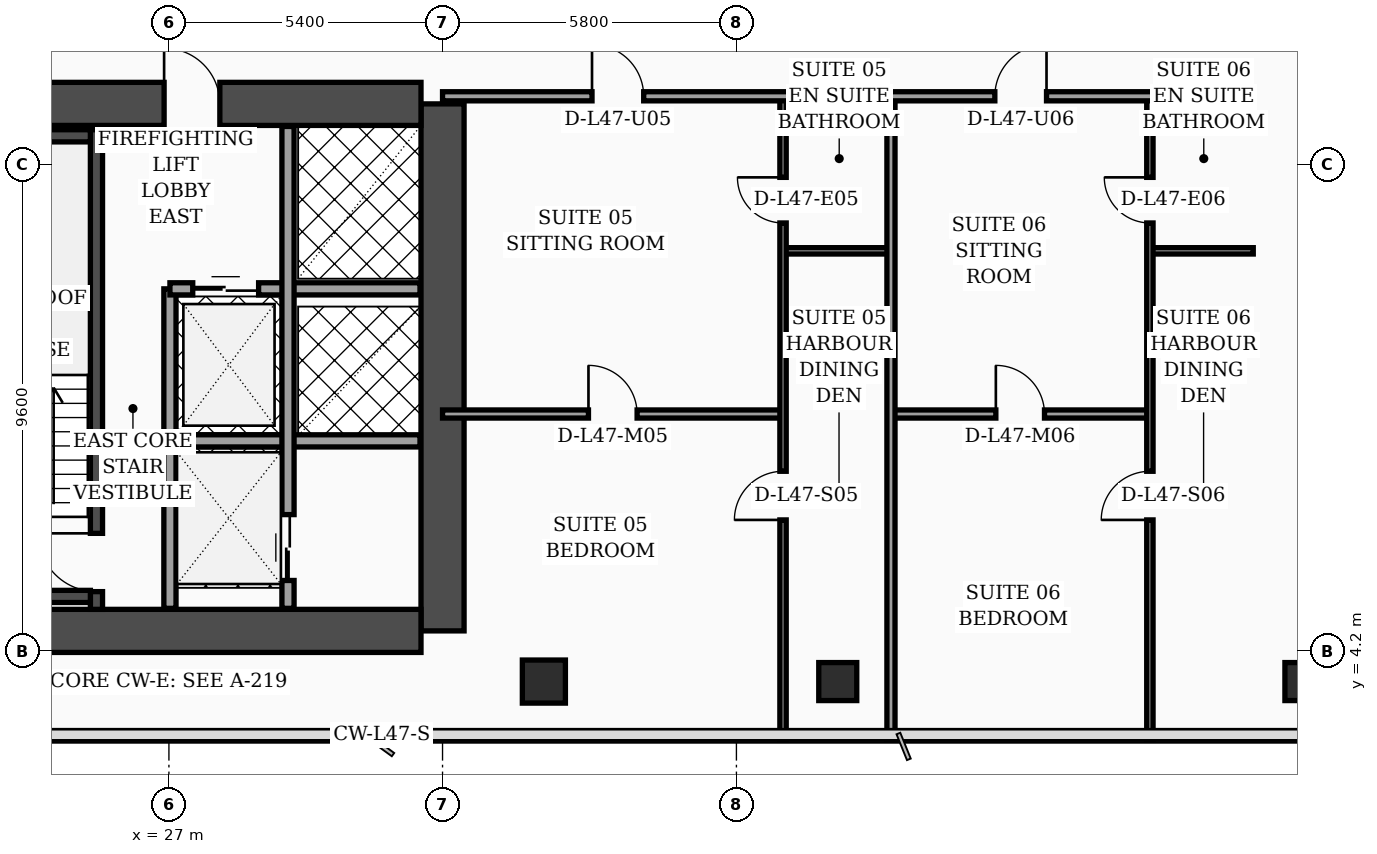
"""IFC4 building model, lengths in metres.
Left out: names, types, materials, properties, quantities, classifications, styles, units other than length and angle.
Written with IfcOpenShell. Run it as: python <this file> out.ifc"""

import sys

from ifc_helpers import new_model, si_unit, direction, frame, frame_2d, origin, origin_2d, place, context, subcontext, project, spatial, rectangle, hollow_rectangle, extrude, element, fill, save


model = new_model("IFC4")
c1 = context("Model", 3, precision=1e-05, world=origin(), true_north=direction((0.0, 1.0)))
c2 = subcontext(c1, "Body", "Model", "MODEL_VIEW")
j1 = project(units=[si_unit("LENGTHUNIT", "METRE"), si_unit("PLANEANGLEUNIT", "RADIAN")], contexts=[c1])
p1 = place(None, origin())
s1 = spatial("IfcSite", under=j1, at=p1, CompositionType="ELEMENT")
p2 = place(p1, origin())
s2 = spatial("IfcBuilding", under=s1, at=p2, CompositionType="ELEMENT")
p3 = place(p2, frame((0.0, 0.0, 191.3)))
s3 = spatial("IfcBuildingStorey", under=s2, at=p3, CompositionType="ELEMENT", Elevation=191.3)
p4 = place(p3, frame((32.4, 4.6, 0.0), z_axis=(0.0, 0.0, 1.0), x_axis=(0.0, 1.0, 0.0)))
e1 = element("IfcWall", 1, at=p4, inside=s3, PredefinedType="SHEAR", context=c2, shape_type="SweptSolid", body=[
    extrude(rectangle(XDim=10.4, YDim=0.85, at=frame_2d((5.2, 0.0))), origin(), (0.0, 0.0, 1.0), 3.56),
])
p5 = place(p3, frame((22.025, 15.0, 0.0), z_axis=(0.0, 0.0, 1.0), x_axis=(1.0, 0.0, 0.0)))
e2 = element("IfcWall", 2, at=p5, inside=s3, PredefinedType="SHEAR", context=c2, shape_type="SweptSolid", body=[
    extrude(rectangle(XDim=9.95, YDim=0.85, at=frame_2d((4.975, 0.0))), origin(), (0.0, 0.0, 1.0), 3.56),
])
p6 = place(p5, frame((4.88, 0.0, 0.0)))
e3 = element("IfcOpeningElement", 3, at=p6, cuts=e2, PredefinedType="OPENING", context=c2, shape_type="SweptSolid", body=[
    extrude(rectangle(XDim=1.1, YDim=2.2, at=frame_2d((0.55, 1.1))), frame((0.0, 0.435, 0.0), z_axis=(0.0, -1.0, 0.0), x_axis=(1.0, 0.0, 0.0)), (0.0, 0.0, 1.0), 0.87),
])
p7 = place(p3, frame((22.025, 4.6, 0.0), z_axis=(0.0, 0.0, 1.0), x_axis=(1.0, 0.0, 0.0)))
e4 = element("IfcWall", 4, at=p7, inside=s3, PredefinedType="SHEAR", context=c2, shape_type="SweptSolid", body=[
    extrude(rectangle(XDim=9.95, YDim=0.85, at=frame_2d((4.975, 0.0))), origin(), (0.0, 0.0, 1.0), 3.56),
])
p8 = place(p3, frame((25.57, 5.025, 0.0), z_axis=(0.0, 0.0, 1.0), x_axis=(0.0, 1.0, 0.0)))
e5 = element("IfcWall", 5, at=p8, inside=s3, PredefinedType="SOLIDWALL", context=c2, shape_type="SweptSolid", body=[
    extrude(rectangle(XDim=9.465, YDim=0.24, at=frame_2d((4.732, 0.0))), origin(), (0.0, 0.0, 1.0), 3.56),
])
p9 = place(p8, frame((0.35, 0.0, 0.0)))
e6 = element("IfcOpeningElement", 6, at=p9, cuts=e5, PredefinedType="OPENING", context=c2, shape_type="SweptSolid", body=[
    extrude(rectangle(XDim=1.15, YDim=2.2, at=frame_2d((0.575, 1.1))), frame((0.0, 0.13, 0.0), z_axis=(0.0, -1.0, 0.0), x_axis=(1.0, 0.0, 0.0)), (0.0, 0.0, 1.0), 0.26),
])
for number, where, z_axis, x_axis in (
    (7, (22.35, 5.28, 0.0), (0.0, 0.0, 1.0), (1.0, 0.0, 0.0)),
    (8, (22.35, 14.37, 0.0), (0.0, 0.0, 1.0), (1.0, 0.0, 0.0)),
):
    element("IfcWall", number, at=place(p3, frame(where, z_axis=z_axis, x_axis=x_axis)), inside=s3, PredefinedType="SOLIDWALL", context=c2, shape_type="SweptSolid", body=[
        extrude(rectangle(XDim=3.1, YDim=0.24, at=frame_2d((1.55, 0.0))), origin(), (0.0, 0.0, 1.0), 3.56),
    ])
p10 = place(p3, frame((34.4, 3.6, 0.0), z_axis=(0.0, 0.0, 1.0), x_axis=(1.0, 0.0, 0.0)))
e9 = element("IfcColumn", 9, at=p10, inside=s3, PredefinedType="COLUMN", context=c2, shape_type="SweptSolid", body=[
    extrude(hollow_rectangle(XDim=0.85, YDim=0.85, WallThickness=0.036, at=origin_2d()), origin(), (0.0, 0.0, 1.0), 3.56),
])
for number, where, z_axis, x_axis in (
    (10, (40.2, 3.6, 0.0), (0.0, 0.0, 1.0), (1.0, 0.0, 0.0)),
    (11, (49.4, 3.6, 0.0), (0.0, 0.0, 1.0), (1.0, 0.0, 0.0)),
):
    element("IfcColumn", number, at=place(p3, frame(where, z_axis=z_axis, x_axis=x_axis)), inside=s3, PredefinedType="COLUMN", context=c2, shape_type="SweptSolid", body=[
        extrude(hollow_rectangle(XDim=0.75, YDim=0.75, WallThickness=0.032, at=origin_2d()), origin(), (0.0, 0.0, 1.0), 3.56),
    ])
p11 = place(p3, frame((55.03, 5.505, 0.0), z_axis=(0.0, 0.0, 1.0), x_axis=(-0.300509063924, 0.953778958931, 0.0)))
e12 = element("IfcWall", 12, at=p11, inside=s3, PredefinedType="SOLIDWALL", context=c2, shape_type="SweptSolid", body=[
    extrude(rectangle(XDim=30.814, YDim=0.32, at=frame_2d((15.407, 0.0))), origin(), (0.0, 0.0, 1.0), 3.56),
])
p12 = place(p11, frame((8.9, 0.0, 0.0)))
e13 = element("IfcOpeningElement", 13, at=p12, cuts=e12, PredefinedType="OPENING", context=c2, shape_type="SweptSolid", body=[
    extrude(rectangle(XDim=1.4, YDim=2.25, at=frame_2d((0.7, 1.125))), frame((0.0, 0.17, 0.0), z_axis=(0.0, -1.0, 0.0), x_axis=(1.0, 0.0, 0.0)), (0.0, 0.0, 1.0), 0.34),
])
p13 = place(p11, frame((4.437, 0.0, 0.7)))
e14 = element("IfcOpeningElement", 14, at=p13, cuts=e12, PredefinedType="OPENING", context=c2, shape_type="SweptSolid", body=[
    extrude(rectangle(XDim=1.6, YDim=1.65, at=frame_2d((0.8, 0.825))), frame((0.0, 0.17, 0.0), z_axis=(0.0, -1.0, 0.0), x_axis=(1.0, 0.0, 0.0)), (0.0, 0.0, 1.0), 0.34),
])
p14 = place(p11, frame((18.696, 0.0, 0.7)))
e15 = element("IfcOpeningElement", 15, at=p14, cuts=e12, PredefinedType="OPENING", context=c2, shape_type="SweptSolid", body=[
    extrude(rectangle(XDim=1.6, YDim=1.65, at=frame_2d((0.8, 0.825))), frame((0.0, 0.17, 0.0), z_axis=(0.0, -1.0, 0.0), x_axis=(1.0, 0.0, 0.0)), (0.0, 0.0, 1.0), 0.34),
])
p15 = place(p11, frame((1.6, 0.0, 0.75)))
e16 = element("IfcOpeningElement", 16, at=p15, cuts=e12, PredefinedType="OPENING", context=c2, shape_type="SweptSolid", body=[
    extrude(rectangle(XDim=1.5, YDim=1.6, at=frame_2d((0.75, 0.8))), frame((0.0, 0.17, 0.0), z_axis=(0.0, -1.0, 0.0), x_axis=(1.0, 0.0, 0.0)), (0.0, 0.0, 1.0), 0.34),
])
p16 = place(p11, frame((6.75, 0.0, 0.75)))
e17 = element("IfcOpeningElement", 17, at=p16, cuts=e12, PredefinedType="OPENING", context=c2, shape_type="SweptSolid", body=[
    extrude(rectangle(XDim=1.5, YDim=1.6, at=frame_2d((0.75, 0.8))), frame((0.0, 0.17, 0.0), z_axis=(0.0, -1.0, 0.0), x_axis=(1.0, 0.0, 0.0)), (0.0, 0.0, 1.0), 0.34),
])
p17 = place(p11, frame((10.9, 0.0, 0.75)))
e18 = element("IfcOpeningElement", 18, at=p17, cuts=e12, PredefinedType="OPENING", context=c2, shape_type="SweptSolid", body=[
    extrude(rectangle(XDim=1.5, YDim=1.6, at=frame_2d((0.75, 0.8))), frame((0.0, 0.17, 0.0), z_axis=(0.0, -1.0, 0.0), x_axis=(1.0, 0.0, 0.0)), (0.0, 0.0, 1.0), 0.34),
])
p18 = place(p11, frame((14.0, 0.0, 0.75)))
e19 = element("IfcOpeningElement", 19, at=p18, cuts=e12, PredefinedType="OPENING", context=c2, shape_type="SweptSolid", body=[
    extrude(rectangle(XDim=1.5, YDim=1.6, at=frame_2d((0.75, 0.8))), frame((0.0, 0.17, 0.0), z_axis=(0.0, -1.0, 0.0), x_axis=(1.0, 0.0, 0.0)), (0.0, 0.0, 1.0), 0.34),
])
p19 = place(p11, frame((16.55, 0.0, 0.75)))
e20 = element("IfcOpeningElement", 20, at=p19, cuts=e12, PredefinedType="OPENING", context=c2, shape_type="SweptSolid", body=[
    extrude(rectangle(XDim=1.5, YDim=1.6, at=frame_2d((0.75, 0.8))), frame((0.0, 0.17, 0.0), z_axis=(0.0, -1.0, 0.0), x_axis=(1.0, 0.0, 0.0)), (0.0, 0.0, 1.0), 0.34),
])
p20 = place(p11, frame((20.75, 0.0, 0.75)))
e21 = element("IfcOpeningElement", 21, at=p20, cuts=e12, PredefinedType="OPENING", context=c2, shape_type="SweptSolid", body=[
    extrude(rectangle(XDim=1.5, YDim=1.6, at=frame_2d((0.75, 0.8))), frame((0.0, 0.17, 0.0), z_axis=(0.0, -1.0, 0.0), x_axis=(1.0, 0.0, 0.0)), (0.0, 0.0, 1.0), 0.34),
])
p21 = place(p11, frame((23.3, 0.0, 0.75)))
e22 = element("IfcOpeningElement", 22, at=p21, cuts=e12, PredefinedType="OPENING", context=c2, shape_type="SweptSolid", body=[
    extrude(rectangle(XDim=1.5, YDim=1.6, at=frame_2d((0.75, 0.8))), frame((0.0, 0.17, 0.0), z_axis=(0.0, -1.0, 0.0), x_axis=(1.0, 0.0, 0.0)), (0.0, 0.0, 1.0), 0.34),
])
p22 = place(p11, frame((26.4, 0.0, 0.75)))
e23 = element("IfcOpeningElement", 23, at=p22, cuts=e12, PredefinedType="OPENING", context=c2, shape_type="SweptSolid", body=[
    extrude(rectangle(XDim=1.5, YDim=1.6, at=frame_2d((0.75, 0.8))), frame((0.0, 0.17, 0.0), z_axis=(0.0, -1.0, 0.0), x_axis=(1.0, 0.0, 0.0)), (0.0, 0.0, 1.0), 0.34),
])
p23 = place(p3, frame((27.02, 5.045, 0.0), z_axis=(0.0, 0.0, 1.0), x_axis=(0.0, 1.0, 0.0)))
e24 = element("IfcWall", 24, at=p23, inside=s3, PredefinedType="SOLIDWALL", context=c2, shape_type="SweptSolid", body=[
    extrude(rectangle(XDim=6.305, YDim=0.24, at=frame_2d((3.153, 0.0))), origin(), (0.0, 0.0, 1.0), 3.56),
])
p24 = place(p3, frame((27.02, 11.35, 0.0), z_axis=(0.0, 0.0, 1.0), x_axis=(1.0, 0.0, 0.0)))
e25 = element("IfcWall", 25, at=p24, inside=s3, PredefinedType="SOLIDWALL", context=c2, shape_type="SweptSolid", body=[
    extrude(rectangle(XDim=4.935, YDim=0.24, at=frame_2d((2.468, 0.0))), origin(), (0.0, 0.0, 1.0), 3.56),
])
p25 = place(p24, frame((0.45, 0.0, 0.0)))
e26 = element("IfcOpeningElement", 26, at=p25, cuts=e25, PredefinedType="OPENING", context=c2, shape_type="SweptSolid", body=[
    extrude(rectangle(XDim=1.3, YDim=2.35, at=frame_2d((0.65, 1.175))), frame((0.0, 0.13, 0.0), z_axis=(0.0, -1.0, 0.0), x_axis=(1.0, 0.0, 0.0)), (0.0, 0.0, 1.0), 0.26),
])
p26 = place(p3, frame((27.02, 8.35, 0.0), z_axis=(0.0, 0.0, 1.0), x_axis=(1.0, 0.0, 0.0)))
e27 = element("IfcWall", 27, at=p26, inside=s3, PredefinedType="SOLIDWALL", context=c2, shape_type="SweptSolid", body=[
    extrude(rectangle(XDim=4.935, YDim=0.24, at=frame_2d((2.468, 0.0))), origin(), (0.0, 0.0, 1.0), 3.09),
])
p27 = place(p3, frame((29.35, 5.045, 0.0), z_axis=(0.0, 0.0, 1.0), x_axis=(0.0, 1.0, 0.0)))
e28 = element("IfcWall", 28, at=p27, inside=s3, PredefinedType="SOLIDWALL", context=c2, shape_type="SweptSolid", body=[
    extrude(rectangle(XDim=9.51, YDim=0.24, at=frame_2d((4.755, 0.0))), origin(), (0.0, 0.0, 1.0), 3.56),
])
p28 = place(p27, frame((0.55, 0.0, 0.0)))
e29 = element("IfcOpeningElement", 29, at=p28, cuts=e28, PredefinedType="OPENING", context=c2, shape_type="SweptSolid", body=[
    extrude(rectangle(XDim=1.3, YDim=2.35, at=frame_2d((0.65, 1.175))), frame((0.0, 0.13, 0.0), z_axis=(0.0, -1.0, 0.0), x_axis=(1.0, 0.0, 0.0)), (0.0, 0.0, 1.0), 0.26),
])
p29 = place(p3, frame((39.12, 12.1, 0.0), z_axis=(0.0, 0.0, 1.0), x_axis=(1.0, 0.0, 0.0)))
e30 = element("IfcWall", 30, at=p29, inside=s3, PredefinedType="PARTITIONING", context=c2, shape_type="SweptSolid", body=[
    extrude(rectangle(XDim=2.13, YDim=0.125, at=frame_2d((1.065, 0.0))), origin(), (0.0, 0.0, 1.0), 3.56),
])
p30 = place(p3, frame((32.4, 8.88, 0.0), z_axis=(0.0, 0.0, 1.0), x_axis=(1.0, 0.0, 0.0)))
e31 = element("IfcWall", 31, at=p30, inside=s3, PredefinedType="PARTITIONING", context=c2, shape_type="SweptSolid", body=[
    extrude(rectangle(XDim=6.72, YDim=0.16, at=frame_2d((3.36, 0.0))), origin(), (0.0, 0.0, 1.0), 2.94),
])
p31 = place(p30, frame((2.88, 0.0, 0.0)))
e32 = element("IfcOpeningElement", 32, at=p31, cuts=e31, PredefinedType="OPENING", context=c2, shape_type="SweptSolid", body=[
    extrude(rectangle(XDim=0.96, YDim=2.2, at=frame_2d((0.48, 1.1))), frame((0.0, 0.09, 0.0), z_axis=(0.0, -1.0, 0.0), x_axis=(1.0, 0.0, 0.0)), (0.0, 0.0, 1.0), 0.18),
])
p32 = place(p3, frame((39.12, 2.44, 0.0), z_axis=(0.0, 0.0, 1.0), x_axis=(0.0, 1.0, 0.0)))
e33 = element("IfcWall", 33, at=p32, inside=s3, PredefinedType="PARTITIONING", context=c2, shape_type="SweptSolid", body=[
    extrude(rectangle(XDim=12.71, YDim=0.125, at=frame_2d((6.355, 0.0))), origin(), (0.0, 0.0, 1.0), 2.94),
])
p33 = place(p32, frame((4.35, 0.0, 0.0)))
e34 = element("IfcOpeningElement", 34, at=p33, cuts=e33, PredefinedType="OPENING", context=c2, shape_type="SweptSolid", body=[
    extrude(rectangle(XDim=0.96, YDim=2.2, at=frame_2d((0.48, 1.1))), frame((0.0, 0.073, 0.0), z_axis=(0.0, -1.0, 0.0), x_axis=(1.0, 0.0, 0.0)), (0.0, 0.0, 1.0), 0.145),
])
p34 = place(p32, frame((10.21, 0.0, 0.0)))
e35 = element("IfcOpeningElement", 35, at=p34, cuts=e33, PredefinedType="OPENING", context=c2, shape_type="SweptSolid", body=[
    extrude(rectangle(XDim=0.9, YDim=2.15, at=frame_2d((0.45, 1.075))), frame((0.0, 0.073, 0.0), z_axis=(0.0, -1.0, 0.0), x_axis=(1.0, 0.0, 0.0)), (0.0, 0.0, 1.0), 0.145),
])
p35 = place(p3, frame((46.36, 12.1, 0.0), z_axis=(0.0, 0.0, 1.0), x_axis=(1.0, 0.0, 0.0)))
e36 = element("IfcWall", 36, at=p35, inside=s3, PredefinedType="PARTITIONING", context=c2, shape_type="SweptSolid", body=[
    extrude(rectangle(XDim=2.04, YDim=0.125, at=frame_2d((1.02, 0.0))), origin(), (0.0, 0.0, 1.0), 3.56),
])
p36 = place(p3, frame((41.25, 8.88, 0.0), z_axis=(0.0, 0.0, 1.0), x_axis=(1.0, 0.0, 0.0)))
e37 = element("IfcWall", 37, at=p36, inside=s3, PredefinedType="PARTITIONING", context=c2, shape_type="SweptSolid", body=[
    extrude(rectangle(XDim=5.11, YDim=0.16, at=frame_2d((2.555, 0.0))), origin(), (0.0, 0.0, 1.0), 3.09),
])
p37 = place(p36, frame((2.07, 0.0, 0.0)))
e38 = element("IfcOpeningElement", 38, at=p37, cuts=e37, PredefinedType="OPENING", context=c2, shape_type="SweptSolid", body=[
    extrude(rectangle(XDim=0.96, YDim=2.2, at=frame_2d((0.48, 1.1))), frame((0.0, 0.09, 0.0), z_axis=(0.0, -1.0, 0.0), x_axis=(1.0, 0.0, 0.0)), (0.0, 0.0, 1.0), 0.18),
])
p38 = place(p3, frame((46.36, 2.44, 0.0), z_axis=(0.0, 0.0, 1.0), x_axis=(0.0, 1.0, 0.0)))
e39 = element("IfcWall", 39, at=p38, inside=s3, PredefinedType="PARTITIONING", context=c2, shape_type="SweptSolid", body=[
    extrude(rectangle(XDim=12.71, YDim=0.125, at=frame_2d((6.355, 0.0))), origin(), (0.0, 0.0, 1.0), 3.09),
])
p39 = place(p38, frame((4.35, 0.0, 0.0)))
e40 = element("IfcOpeningElement", 40, at=p39, cuts=e39, PredefinedType="OPENING", context=c2, shape_type="SweptSolid", body=[
    extrude(rectangle(XDim=0.96, YDim=2.2, at=frame_2d((0.48, 1.1))), frame((0.0, 0.073, 0.0), z_axis=(0.0, -1.0, 0.0), x_axis=(1.0, 0.0, 0.0)), (0.0, 0.0, 1.0), 0.145),
])
p40 = place(p38, frame((10.21, 0.0, 0.0)))
e41 = element("IfcOpeningElement", 41, at=p40, cuts=e39, PredefinedType="OPENING", context=c2, shape_type="SweptSolid", body=[
    extrude(rectangle(XDim=0.9, YDim=2.15, at=frame_2d((0.45, 1.075))), frame((0.0, 0.073, 0.0), z_axis=(0.0, -1.0, 0.0), x_axis=(1.0, 0.0, 0.0)), (0.0, 0.0, 1.0), 0.145),
])
p41 = place(p3, frame((41.25, 2.44, 0.0), z_axis=(0.0, 0.0, 1.0), x_axis=(0.0, 1.0, 0.0)))
e42 = element("IfcWall", 42, at=p41, inside=s3, PredefinedType="PARTITIONING", context=c2, shape_type="SweptSolid", body=[
    extrude(rectangle(XDim=12.71, YDim=0.16, at=frame_2d((6.355, 0.0))), origin(), (0.0, 0.0, 1.0), 3.09),
])
p42 = place(p3, frame((32.4, 15.15, 0.0), z_axis=(0.0, 0.0, 1.0), x_axis=(1.0, 0.0, 0.0)))
e43 = element("IfcWall", 43, at=p42, inside=s3, PredefinedType="PARTITIONING", context=c2, shape_type="SweptSolid", body=[
    extrude(rectangle(XDim=16.0, YDim=0.18, at=frame_2d((8.0, 0.0))), origin(), (0.0, 0.0, 1.0), 2.94),
])
p43 = place(p42, frame((2.95, 0.0, 0.0)))
e44 = element("IfcOpeningElement", 44, at=p43, cuts=e43, PredefinedType="OPENING", context=c2, shape_type="SweptSolid", body=[
    extrude(rectangle(XDim=1.02, YDim=2.2, at=frame_2d((0.51, 1.1))), frame((0.0, 0.1, 0.0), z_axis=(0.0, -1.0, 0.0), x_axis=(1.0, 0.0, 0.0)), (0.0, 0.0, 1.0), 0.2),
])
p44 = place(p42, frame((10.9, 0.0, 0.0)))
e45 = element("IfcOpeningElement", 45, at=p44, cuts=e43, PredefinedType="OPENING", context=c2, shape_type="SweptSolid", body=[
    extrude(rectangle(XDim=1.02, YDim=2.2, at=frame_2d((0.51, 1.1))), frame((0.0, 0.1, 0.0), z_axis=(0.0, -1.0, 0.0), x_axis=(1.0, 0.0, 0.0)), (0.0, 0.0, 1.0), 0.2),
])
p45 = place(p25, origin())
e46 = element("IfcDoor", 46, at=p45, inside=s3, OperationType="DOUBLE_DOOR_SLIDING", PredefinedType="DOOR", context=c2, shape_type="SweptSolid", body=[
    extrude(rectangle(XDim=1.3, YDim=2.35, at=frame_2d((0.65, 1.175))), frame((0.0, 0.025, 0.0), z_axis=(0.0, -1.0, 0.0), x_axis=(1.0, 0.0, 0.0)), (0.0, 0.0, 1.0), 0.05),
])
fill(e26, e46)
p46 = place(p28, origin())
e47 = element("IfcDoor", 47, at=p46, inside=s3, OperationType="DOUBLE_DOOR_SLIDING", PredefinedType="DOOR", context=c2, shape_type="SweptSolid", body=[
    extrude(rectangle(XDim=1.3, YDim=2.35, at=frame_2d((0.65, 1.175))), frame((0.0, 0.025, 0.0), z_axis=(0.0, -1.0, 0.0), x_axis=(1.0, 0.0, 0.0)), (0.0, 0.0, 1.0), 0.05),
])
fill(e29, e47)
p47 = place(p31, origin())
e48 = element("IfcDoor", 48, at=p47, inside=s3, OperationType="SINGLE_SWING_LEFT", PredefinedType="DOOR", context=c2, shape_type="SweptSolid", body=[
    extrude(rectangle(XDim=0.96, YDim=2.2, at=frame_2d((0.48, 1.1))), frame((0.0, 0.025, 0.0), z_axis=(0.0, -1.0, 0.0), x_axis=(1.0, 0.0, 0.0)), (0.0, 0.0, 1.0), 0.05),
])
fill(e32, e48)
p48 = place(p33, origin())
e49 = element("IfcDoor", 49, at=p48, inside=s3, OperationType="SINGLE_SWING_LEFT", PredefinedType="DOOR", context=c2, shape_type="SweptSolid", body=[
    extrude(rectangle(XDim=0.96, YDim=2.2, at=frame_2d((0.48, 1.1))), frame((0.0, 0.025, 0.0), z_axis=(0.0, -1.0, 0.0), x_axis=(1.0, 0.0, 0.0)), (0.0, 0.0, 1.0), 0.05),
])
fill(e34, e49)
p49 = place(p34, origin())
e50 = element("IfcDoor", 50, at=p49, inside=s3, OperationType="SINGLE_SWING_RIGHT", PredefinedType="DOOR", context=c2, shape_type="SweptSolid", body=[
    extrude(rectangle(XDim=0.9, YDim=2.15, at=frame_2d((0.45, 1.075))), frame((0.0, 0.025, 0.0), z_axis=(0.0, -1.0, 0.0), x_axis=(1.0, 0.0, 0.0)), (0.0, 0.0, 1.0), 0.05),
])
fill(e35, e50)
p50 = place(p37, origin())
e51 = element("IfcDoor", 51, at=p50, inside=s3, OperationType="SINGLE_SWING_LEFT", PredefinedType="DOOR", context=c2, shape_type="SweptSolid", body=[
    extrude(rectangle(XDim=0.96, YDim=2.2, at=frame_2d((0.48, 1.1))), frame((0.0, 0.025, 0.0), z_axis=(0.0, -1.0, 0.0), x_axis=(1.0, 0.0, 0.0)), (0.0, 0.0, 1.0), 0.05),
])
fill(e38, e51)
p51 = place(p39, origin())
e52 = element("IfcDoor", 52, at=p51, inside=s3, OperationType="SINGLE_SWING_LEFT", PredefinedType="DOOR", context=c2, shape_type="SweptSolid", body=[
    extrude(rectangle(XDim=0.96, YDim=2.2, at=frame_2d((0.48, 1.1))), frame((0.0, 0.025, 0.0), z_axis=(0.0, -1.0, 0.0), x_axis=(1.0, 0.0, 0.0)), (0.0, 0.0, 1.0), 0.05),
])
fill(e40, e52)
p52 = place(p40, origin())
e53 = element("IfcDoor", 53, at=p52, inside=s3, OperationType="SINGLE_SWING_RIGHT", PredefinedType="DOOR", context=c2, shape_type="SweptSolid", body=[
    extrude(rectangle(XDim=0.9, YDim=2.15, at=frame_2d((0.45, 1.075))), frame((0.0, 0.025, 0.0), z_axis=(0.0, -1.0, 0.0), x_axis=(1.0, 0.0, 0.0)), (0.0, 0.0, 1.0), 0.05),
])
fill(e41, e53)
p53 = place(p43, origin())
e54 = element("IfcDoor", 54, at=p53, inside=s3, OperationType="SINGLE_SWING_LEFT", PredefinedType="DOOR", context=c2, shape_type="SweptSolid", body=[
    extrude(rectangle(XDim=1.02, YDim=2.2, at=frame_2d((0.51, 1.1))), frame((0.0, 0.025, 0.0), z_axis=(0.0, -1.0, 0.0), x_axis=(1.0, 0.0, 0.0)), (0.0, 0.0, 1.0), 0.05),
])
fill(e44, e54)
p54 = place(p44, origin())
e55 = element("IfcDoor", 55, at=p54, inside=s3, OperationType="SINGLE_SWING_RIGHT", PredefinedType="DOOR", context=c2, shape_type="SweptSolid", body=[
    extrude(rectangle(XDim=1.02, YDim=2.2, at=frame_2d((0.51, 1.1))), frame((0.0, 0.025, 0.0), z_axis=(0.0, -1.0, 0.0), x_axis=(1.0, 0.0, 0.0)), (0.0, 0.0, 1.0), 0.05),
])
fill(e45, e55)
p55 = place(p9, origin())
e56 = element("IfcDoor", 56, at=p55, inside=s3, OperationType="SINGLE_SWING_RIGHT", PredefinedType="DOOR", context=c2, shape_type="SweptSolid", body=[
    extrude(rectangle(XDim=1.15, YDim=2.2, at=frame_2d((0.575, 1.1))), frame((0.0, 0.025, 0.0), z_axis=(0.0, -1.0, 0.0), x_axis=(1.0, 0.0, 0.0)), (0.0, 0.0, 1.0), 0.05),
])
fill(e6, e56)
p56 = place(p6, origin())
e57 = element("IfcDoor", 57, at=p56, inside=s3, OperationType="SINGLE_SWING_LEFT", PredefinedType="DOOR", context=c2, shape_type="SweptSolid", body=[
    extrude(rectangle(XDim=1.1, YDim=2.2, at=frame_2d((0.55, 1.1))), frame((0.0, 0.025, 0.0), z_axis=(0.0, -1.0, 0.0), x_axis=(1.0, 0.0, 0.0)), (0.0, 0.0, 1.0), 0.05),
])
fill(e3, e57)
save(model, sys.argv[1])
